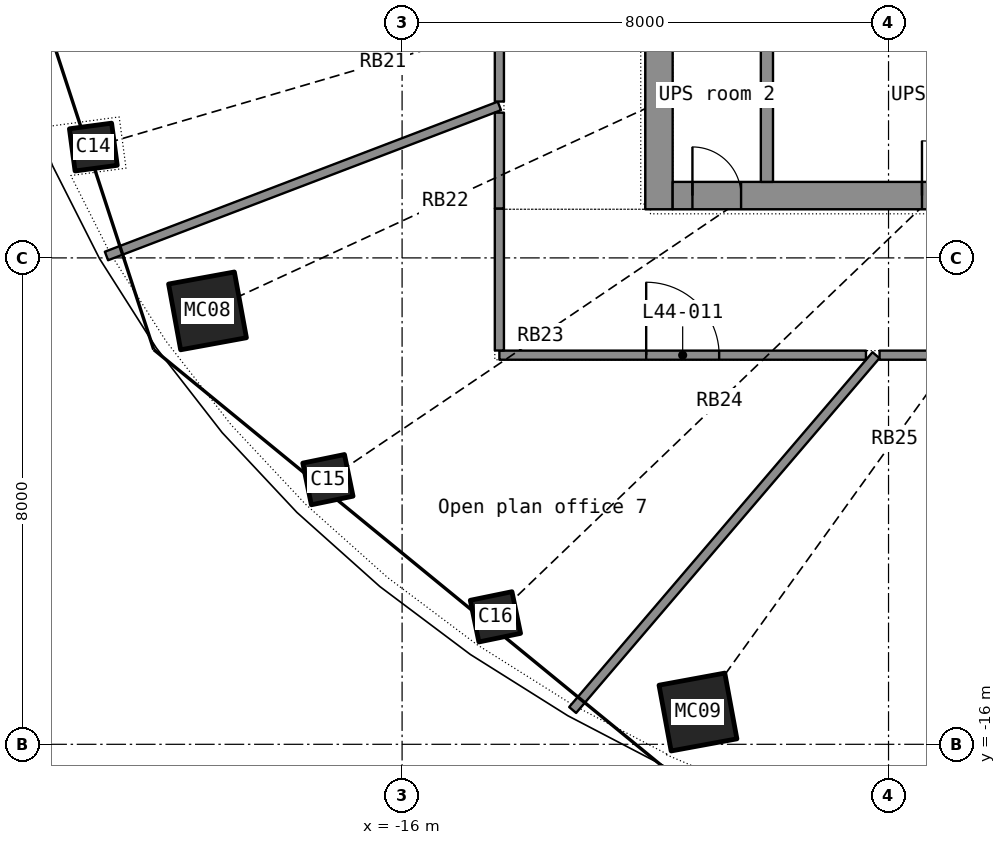
"""IFC4 building model, lengths in metres.
Left out: names, types, materials, properties, quantities, classifications, styles, units other than length and angle.
Written with IfcOpenShell. Run it as: python <this file> out.ifc"""

import sys

from ifc_helpers import new_model, si_unit, direction, frame, frame_2d, origin, origin_2d, place, context, subcontext, project, spatial, rectangle, hollow_rectangle, extrude, element, fill, save


model = new_model("IFC4")
c1 = context("Model", 3, precision=1e-05, world=origin(), true_north=direction((0.0, 1.0)))
c2 = subcontext(c1, "Body", "Model", "MODEL_VIEW")
j1 = project(units=[si_unit("LENGTHUNIT", "METRE"), si_unit("PLANEANGLEUNIT", "RADIAN")], contexts=[c1])
p1 = place(None, origin())
s1 = spatial("IfcSite", under=j1, at=p1, CompositionType="ELEMENT")
p2 = place(p1, origin())
s2 = spatial("IfcBuilding", under=s1, at=p2, CompositionType="ELEMENT")
p3 = place(p2, frame((0.0, 0.0, 183.0)))
s3 = spatial("IfcBuildingStorey", under=s2, at=p3, CompositionType="ELEMENT", Elevation=183.0)
p4 = place(p3, frame((-21.078, -6.177, 0.0), z_axis=(0.032511791, 0.009694185, 0.999424337), x_axis=(-0.410283377, 0.911946978, 0.004501056)))
e1 = element("IfcColumn", 1, at=p4, inside=s3, PredefinedType="COLUMN", context=c2, shape_type="SweptSolid", body=[
    extrude(hollow_rectangle(XDim=0.7, YDim=0.7, WallThickness=0.025, at=origin_2d()), origin(), (0.0, 0.0, 1.0), 3.702),
])
p5 = place(p3, frame((-19.2, -8.872, 0.0), z_axis=(0.030006556, 0.014178922, 0.999449131), x_axis=(-0.583040674, 0.812420964, 0.005979083)))
e2 = element("IfcColumn", 2, at=p5, inside=s3, PredefinedType="COLUMN", context=c2, shape_type="SweptSolid", body=[
    extrude(hollow_rectangle(XDim=1.1, YDim=1.1, WallThickness=0.032, at=origin_2d()), origin(), (0.0, 0.0, 1.0), 3.702),
])
p6 = place(p3, frame((-17.22, -11.647, 0.0), z_axis=(0.026512147, 0.01826832, 0.999481553), x_axis=(-0.72150473, 0.692379152, 0.006483397)))
e3 = element("IfcColumn", 3, at=p6, inside=s3, PredefinedType="COLUMN", context=c2, shape_type="SweptSolid", body=[
    extrude(hollow_rectangle(XDim=0.7, YDim=0.7, WallThickness=0.025, at=origin_2d()), origin(), (0.0, 0.0, 1.0), 3.702),
])
p7 = place(p3, frame((-14.465, -13.904, 0.0), z_axis=(0.022226156, 0.021698532, 0.999517469), x_axis=(-0.828428784, 0.560059391, 0.006263343)))
e4 = element("IfcColumn", 4, at=p7, inside=s3, PredefinedType="COLUMN", context=c2, shape_type="SweptSolid", body=[
    extrude(hollow_rectangle(XDim=0.7, YDim=0.7, WallThickness=0.025, at=origin_2d()), origin(), (0.0, 0.0, 1.0), 3.702),
])
p8 = place(p3, frame((-11.134, -15.469, 0.0), z_axis=(0.017280237, 0.024535299, 0.999549605), x_axis=(-0.90830012, 0.418283813, 0.005435371)))
e5 = element("IfcColumn", 5, at=p8, inside=s3, PredefinedType="COLUMN", context=c2, shape_type="SweptSolid", body=[
    extrude(hollow_rectangle(XDim=1.1, YDim=1.1, WallThickness=0.032, at=origin_2d()), origin(), (0.0, 0.0, 1.0), 3.702),
])
p9 = place(p3, frame((-11.775, -7.2, 0.0), z_axis=(0.0, 0.0, 1.0), x_axis=(0.0, 1.0, 0.0)))
e6 = element("IfcWall", 6, at=p9, inside=s3, PredefinedType="SHEAR", context=c2, shape_type="SweptSolid", body=[
    extrude(rectangle(XDim=14.4, YDim=0.45, at=frame_2d((7.2, 0.0))), origin(), (0.0, 0.0, 1.0), 3.3),
])
p10 = place(p9, frame((6.5, 0.0, 0.0)))
e7 = element("IfcOpeningElement", 7, at=p10, cuts=e6, PredefinedType="OPENING", context=c2, shape_type="SweptSolid", body=[
    extrude(rectangle(XDim=1.4, YDim=2.2, at=frame_2d((0.7, 1.1))), frame((0.0, 0.235, 0.0), z_axis=(0.0, -1.0, 0.0), x_axis=(1.0, 0.0, 0.0)), (0.0, 0.0, 1.0), 0.47),
])
p11 = place(p3, frame((-11.55, -6.975, 0.0), z_axis=(0.0, 0.0, 1.0), x_axis=(1.0, 0.0, 0.0)))
e8 = element("IfcWall", 8, at=p11, inside=s3, PredefinedType="SHEAR", context=c2, shape_type="SweptSolid", body=[
    extrude(rectangle(XDim=23.1, YDim=0.45, at=frame_2d((11.55, 0.0))), origin(), (0.0, 0.0, 1.0), 3.3),
])
p12 = place(p11, frame((20.0, 0.0, 0.0)))
e9 = element("IfcOpeningElement", 9, at=p12, cuts=e8, PredefinedType="OPENING", context=c2, shape_type="SweptSolid", body=[
    extrude(rectangle(XDim=1.1, YDim=2.2, at=frame_2d((0.55, 1.1))), frame((0.0, 0.235, 0.0), z_axis=(0.0, -1.0, 0.0), x_axis=(1.0, 0.0, 0.0)), (0.0, 0.0, 1.0), 0.47),
])
p13 = place(p11, frame((4.1, 0.0, 0.0)))
e10 = element("IfcOpeningElement", 10, at=p13, cuts=e8, PredefinedType="OPENING", context=c2, shape_type="SweptSolid", body=[
    extrude(rectangle(XDim=0.9, YDim=2.1, at=frame_2d((0.45, 1.05))), frame((0.0, 0.235, 0.0), z_axis=(0.0, -1.0, 0.0), x_axis=(1.0, 0.0, 0.0)), (0.0, 0.0, 1.0), 0.47),
])
p14 = place(p11, frame((9.1, 0.0, 0.0)))
e11 = element("IfcOpeningElement", 11, at=p14, cuts=e8, PredefinedType="OPENING", context=c2, shape_type="SweptSolid", body=[
    extrude(rectangle(XDim=0.9, YDim=2.1, at=frame_2d((0.45, 1.05))), frame((0.0, 0.235, 0.0), z_axis=(0.0, -1.0, 0.0), x_axis=(1.0, 0.0, 0.0)), (0.0, 0.0, 1.0), 0.47),
])
p15 = place(p11, frame((15.1, 0.0, 0.0)))
e12 = element("IfcOpeningElement", 12, at=p15, cuts=e8, PredefinedType="OPENING", context=c2, shape_type="SweptSolid", body=[
    extrude(rectangle(XDim=0.9, YDim=2.1, at=frame_2d((0.45, 1.05))), frame((0.0, 0.235, 0.0), z_axis=(0.0, -1.0, 0.0), x_axis=(1.0, 0.0, 0.0)), (0.0, 0.0, 1.0), 0.47),
])
p16 = place(p11, frame((0.325, 0.0, 0.0)))
e13 = element("IfcOpeningElement", 13, at=p16, cuts=e8, PredefinedType="OPENING", context=c2, shape_type="SweptSolid", body=[
    extrude(rectangle(XDim=0.8, YDim=2.05, at=frame_2d((0.4, 1.025))), frame((0.0, 0.235, 0.0), z_axis=(0.0, -1.0, 0.0), x_axis=(1.0, 0.0, 0.0)), (0.0, 0.0, 1.0), 0.47),
])
p17 = place(p11, frame((21.975, 0.0, 0.0)))
e14 = element("IfcOpeningElement", 14, at=p17, cuts=e8, PredefinedType="OPENING", context=c2, shape_type="SweptSolid", body=[
    extrude(rectangle(XDim=0.8, YDim=2.05, at=frame_2d((0.4, 1.025))), frame((0.0, 0.235, 0.0), z_axis=(0.0, -1.0, 0.0), x_axis=(1.0, 0.0, 0.0)), (0.0, 0.0, 1.0), 0.47),
])
p18 = place(p3, frame((-10.0, -6.75, 0.0), z_axis=(0.0, 0.0, 1.0), x_axis=(0.0, 1.0, 0.0)))
e15 = element("IfcWall", 15, at=p18, inside=s3, PredefinedType="SHEAR", context=c2, shape_type="SweptSolid", body=[
    extrude(rectangle(XDim=2.85, YDim=0.2, at=frame_2d((1.425, 0.0))), origin(), (0.0, 0.0, 1.0), 3.3),
])
p19 = place(p3, frame((-13.195, -15.436, 0.0), z_axis=(0.0, 0.0, 1.0), x_axis=(0.64979567, 0.760108931, 0.0)))
e16 = element("IfcWall", 16, at=p19, inside=s3, PredefinedType="PARTITIONING", context=c2, shape_type="SweptSolid", body=[
    extrude(rectangle(XDim=7.677, YDim=0.15, at=frame_2d((3.839, 0.0))), origin(), (0.0, 0.0, 1.0), 2.4),
])
p20 = place(p3, frame((-8.147, -9.6, 0.0), z_axis=(0.0, 0.0, 1.0), x_axis=(1.0, 0.0, 0.0)))
e17 = element("IfcWall", 17, at=p20, inside=s3, PredefinedType="PARTITIONING", context=c2, shape_type="SweptSolid", body=[
    extrude(rectangle(XDim=7.037, YDim=0.15, at=frame_2d((3.518, 0.0))), origin(), (0.0, 0.0, 1.0), 2.4),
])
p21 = place(p20, frame((2.918, 0.0, 0.0)))
e18 = element("IfcOpeningElement", 18, at=p21, cuts=e17, PredefinedType="OPENING", context=c2, shape_type="SweptSolid", body=[
    extrude(rectangle(XDim=1.2, YDim=2.2, at=frame_2d((0.6, 1.1))), frame((0.0, 0.085, 0.0), z_axis=(0.0, -1.0, 0.0), x_axis=(1.0, 0.0, 0.0)), (0.0, 0.0, 1.0), 0.17),
])
p22 = place(p3, frame((-20.862, -7.969, 0.0), z_axis=(0.0, 0.0, 1.0), x_axis=(0.934170905, 0.356825897, 0.0)))
e19 = element("IfcWall", 19, at=p22, inside=s3, PredefinedType="PARTITIONING", context=c2, shape_type="SweptSolid", body=[
    extrude(rectangle(XDim=6.917, YDim=0.15, at=frame_2d((3.458, 0.0))), origin(), (0.0, 0.0, 1.0), 2.4),
])
p23 = place(p3, frame((-14.4, -9.6, 0.0), z_axis=(0.0, 0.0, 1.0), x_axis=(1.0, 0.0, 0.0)))
e20 = element("IfcWall", 20, at=p23, inside=s3, PredefinedType="PARTITIONING", context=c2, shape_type="SweptSolid", body=[
    extrude(rectangle(XDim=6.029, YDim=0.15, at=frame_2d((3.014, 0.0))), origin(), (0.0, 0.0, 1.0), 2.4),
])
p24 = place(p23, frame((2.414, 0.0, 0.0)))
e21 = element("IfcOpeningElement", 21, at=p24, cuts=e20, PredefinedType="OPENING", context=c2, shape_type="SweptSolid", body=[
    extrude(rectangle(XDim=1.2, YDim=2.2, at=frame_2d((0.6, 1.1))), frame((0.0, 0.085, 0.0), z_axis=(0.0, -1.0, 0.0), x_axis=(1.0, 0.0, 0.0)), (0.0, 0.0, 1.0), 0.17),
])
p25 = place(p3, frame((-14.4, -1.577, 0.0), z_axis=(0.0, 0.0, 1.0), x_axis=(0.0, -1.0, 0.0)))
e22 = element("IfcWall", 22, at=p25, inside=s3, PredefinedType="PARTITIONING", context=c2, shape_type="SweptSolid", body=[
    extrude(rectangle(XDim=3.851, YDim=0.15, at=frame_2d((1.926, 0.0))), origin(), (0.0, 0.0, 1.0), 2.4),
])
p26 = place(p3, frame((-14.4, -7.188, 0.0), z_axis=(0.0, 0.0, 1.0), x_axis=(0.0, -1.0, 0.0)))
e23 = element("IfcWall", 23, at=p26, inside=s3, PredefinedType="PARTITIONING", context=c2, shape_type="SweptSolid", body=[
    extrude(rectangle(XDim=2.335, YDim=0.15, at=frame_2d((1.167, 0.0))), origin(), (0.0, 0.0, 1.0), 2.4),
])
p27 = place(p3, frame((-14.4, -5.611, 0.0), z_axis=(0.0, 0.0, 1.0), x_axis=(0.0, -1.0, 0.0)))
e24 = element("IfcWall", 24, at=p27, inside=s3, PredefinedType="PARTITIONING", context=c2, shape_type="SweptSolid", body=[
    extrude(rectangle(XDim=1.576, YDim=0.15, at=frame_2d((0.788, 0.0))), origin(), (0.0, 0.0, 1.0), 2.4),
])
p28 = place(p13, origin())
e25 = element("IfcDoor", 25, at=p28, inside=s3, OperationType="SINGLE_SWING_LEFT", PredefinedType="DOOR", context=c2, shape_type="SweptSolid", body=[
    extrude(rectangle(XDim=0.9, YDim=2.1, at=frame_2d((0.45, 1.05))), frame((0.0, 0.025, 0.0), z_axis=(0.0, -1.0, 0.0), x_axis=(1.0, 0.0, 0.0)), (0.0, 0.0, 1.0), 0.05),
])
fill(e10, e25)
p29 = place(p16, origin())
e26 = element("IfcDoor", 26, at=p29, inside=s3, OperationType="SINGLE_SWING_LEFT", PredefinedType="DOOR", context=c2, shape_type="SweptSolid", body=[
    extrude(rectangle(XDim=0.8, YDim=2.05, at=frame_2d((0.4, 1.025))), frame((0.0, 0.025, 0.0), z_axis=(0.0, -1.0, 0.0), x_axis=(1.0, 0.0, 0.0)), (0.0, 0.0, 1.0), 0.05),
])
fill(e13, e26)
p30 = place(p24, origin())
e27 = element("IfcDoor", 27, at=p30, inside=s3, OperationType="DOUBLE_DOOR_SINGLE_SWING", PredefinedType="DOOR", context=c2, shape_type="SweptSolid", body=[
    extrude(rectangle(XDim=1.2, YDim=2.2, at=frame_2d((0.6, 1.1))), frame((0.0, 0.025, 0.0), z_axis=(0.0, -1.0, 0.0), x_axis=(1.0, 0.0, 0.0)), (0.0, 0.0, 1.0), 0.05),
])
fill(e21, e27)
save(model, sys.argv[1])
